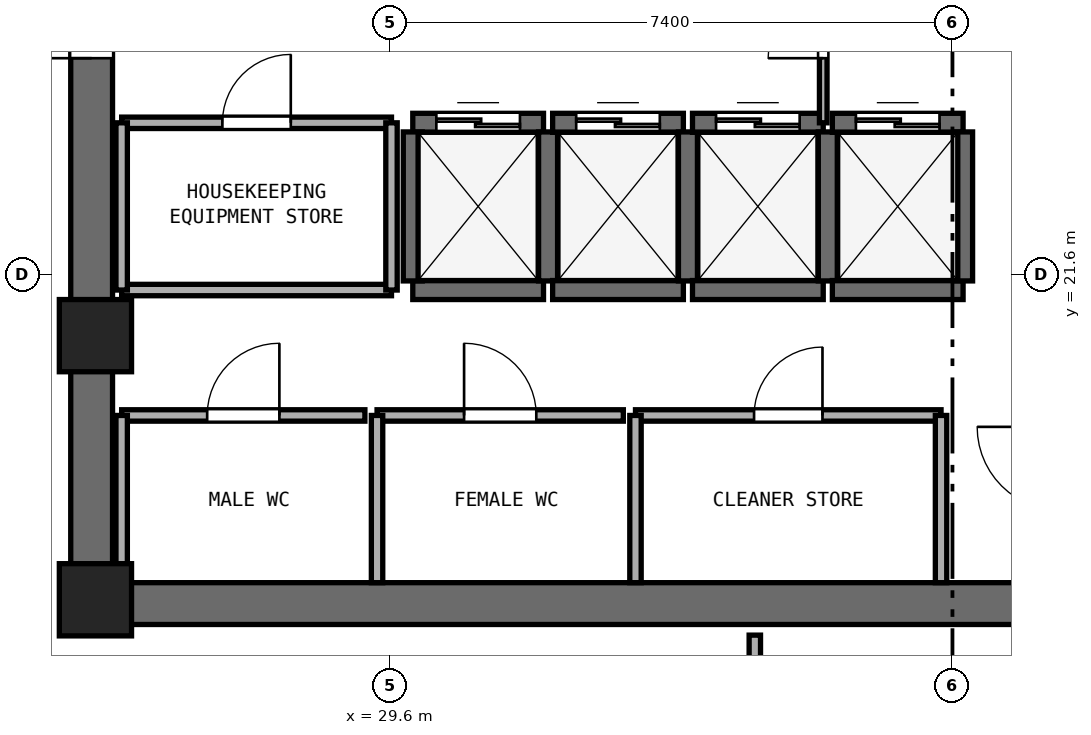
"""IFC4 building model, lengths in metres.
Left out: names, types, materials, properties, quantities, classifications, styles, units other than length and angle.
Written with IfcOpenShell. Run it as: python <this file> out.ifc"""

import sys

from ifc_helpers import new_model, si_unit, direction, frame, frame_2d, origin, origin_2d, place, context, subcontext, project, spatial, rectangle, extrude, element, fill, save


model = new_model("IFC4")
c1 = context("Model", 3, precision=1e-05, world=origin(), true_north=direction((0.0, 1.0)))
c2 = subcontext(c1, "Body", "Model", "MODEL_VIEW")
j1 = project(units=[si_unit("LENGTHUNIT", "METRE"), si_unit("PLANEANGLEUNIT", "RADIAN")], contexts=[c1])
p1 = place(None, origin())
s1 = spatial("IfcSite", under=j1, at=p1, CompositionType="ELEMENT")
p2 = place(p1, origin())
s2 = spatial("IfcBuilding", under=s1, at=p2, CompositionType="ELEMENT")
p3 = place(p2, frame((0.0, 0.0, 170.6)))
s3 = spatial("IfcBuildingStorey", under=s2, at=p3, CompositionType="ELEMENT", Elevation=170.6)
p4 = place(p3, frame((25.4, 17.275, 0.0), z_axis=(0.0, 0.0, 1.0), x_axis=(1.0, 0.0, 0.0)))
e1 = element("IfcWall", 1, at=p4, inside=s3, PredefinedType="SHEAR", context=c2, shape_type="SweptSolid", body=[
    extrude(rectangle(XDim=23.2, YDim=0.55, at=frame_2d((11.6, 0.0))), origin(), (0.0, 0.0, 1.0), 3.54),
])
p5 = place(p3, frame((25.675, 17.55, 0.0), z_axis=(0.0, 0.0, 1.0), x_axis=(0.0, 1.0, 0.0)))
e2 = element("IfcWall", 2, at=p5, inside=s3, PredefinedType="SHEAR", context=c2, shape_type="SweptSolid", body=[
    extrude(rectangle(XDim=15.3, YDim=0.55, at=frame_2d((7.65, 0.0))), origin(), (0.0, 0.0, 1.0), 3.54),
])
p6 = place(p5, frame((6.9, 0.0, 0.0)))
e3 = element("IfcOpeningElement", 3, at=p6, cuts=e2, PredefinedType="OPENING", context=c2, shape_type="SweptSolid", body=[
    extrude(rectangle(XDim=1.5, YDim=2.15, at=frame_2d((0.75, 1.075))), frame((0.0, 0.285, 0.0), z_axis=(0.0, -1.0, 0.0), x_axis=(1.0, 0.0, 0.0)), (0.0, 0.0, 1.0), 0.57),
])
for number, where, z_axis, x_axis in (
    (4, (25.725, 17.325, 0.0), (0.0, 0.0, 1.0), (1.0, 0.0, 0.0)),
    (5, (25.725, 20.8, 0.0), (0.0, 0.0, 1.0), (1.0, 0.0, 0.0)),
):
    element("IfcColumn", number, at=place(p3, frame(where, z_axis=z_axis, x_axis=x_axis)), inside=s3, PredefinedType="PILASTER", context=c2, shape_type="SweptSolid", body=[
        extrude(rectangle(XDim=0.95, YDim=0.95, at=origin_2d()), origin(), (0.0, 0.0, 1.0), 3.8),
    ])
p7 = place(p3, frame((29.9, 21.4, 0.0), z_axis=(0.0, 0.0, 1.0), x_axis=(1.0, 0.0, 0.0)))
e6 = element("IfcWall", 6, at=p7, inside=s3, PredefinedType="SHEAR", context=c2, shape_type="SweptSolid", body=[
    extrude(rectangle(XDim=1.72, YDim=0.25, at=frame_2d((0.86, 0.0))), origin(), (0.0, 0.0, 1.0), 3.54),
])
p8 = place(p3, frame((29.9, 23.6, 0.0), z_axis=(0.0, 0.0, 1.0), x_axis=(1.0, 0.0, 0.0)))
e7 = element("IfcWall", 7, at=p8, inside=s3, PredefinedType="SHEAR", context=c2, shape_type="SweptSolid", body=[
    extrude(rectangle(XDim=1.72, YDim=0.25, at=frame_2d((0.86, 0.0))), origin(), (0.0, 0.0, 1.0), 3.54),
])
p9 = place(p8, frame((0.31, 0.0, 0.0)))
e8 = element("IfcOpeningElement", 8, at=p9, cuts=e7, PredefinedType="OPENING", context=c2, shape_type="SweptSolid", body=[
    extrude(rectangle(XDim=1.1, YDim=2.15, at=frame_2d((0.55, 1.075))), frame((0.0, 0.135, 0.0), z_axis=(0.0, -1.0, 0.0), x_axis=(1.0, 0.0, 0.0)), (0.0, 0.0, 1.0), 0.27),
])
for number, where, z_axis, x_axis in (
    (9, (29.9, 21.52, 0.0), (0.0, 0.0, 1.0), (0.0, 1.0, 0.0)),
    (10, (31.68, 21.52, 0.0), (0.0, 0.0, 1.0), (0.0, 1.0, 0.0)),
):
    element("IfcWall", number, at=place(p3, frame(where, z_axis=z_axis, x_axis=x_axis)), inside=s3, PredefinedType="SHEAR", context=c2, shape_type="SweptSolid", body=[
        extrude(rectangle(XDim=1.96, YDim=0.25, at=frame_2d((0.98, 0.0))), origin(), (0.0, 0.0, 1.0), 3.54),
    ])
p10 = place(p3, frame((31.74, 21.4, 0.0), z_axis=(0.0, 0.0, 1.0), x_axis=(1.0, 0.0, 0.0)))
e11 = element("IfcWall", 11, at=p10, inside=s3, PredefinedType="SHEAR", context=c2, shape_type="SweptSolid", body=[
    extrude(rectangle(XDim=1.72, YDim=0.25, at=frame_2d((0.86, 0.0))), origin(), (0.0, 0.0, 1.0), 3.54),
])
p11 = place(p3, frame((31.74, 23.6, 0.0), z_axis=(0.0, 0.0, 1.0), x_axis=(1.0, 0.0, 0.0)))
e12 = element("IfcWall", 12, at=p11, inside=s3, PredefinedType="SHEAR", context=c2, shape_type="SweptSolid", body=[
    extrude(rectangle(XDim=1.72, YDim=0.25, at=frame_2d((0.86, 0.0))), origin(), (0.0, 0.0, 1.0), 3.54),
])
p12 = place(p11, frame((0.31, 0.0, 0.0)))
e13 = element("IfcOpeningElement", 13, at=p12, cuts=e12, PredefinedType="OPENING", context=c2, shape_type="SweptSolid", body=[
    extrude(rectangle(XDim=1.1, YDim=2.15, at=frame_2d((0.55, 1.075))), frame((0.0, 0.135, 0.0), z_axis=(0.0, -1.0, 0.0), x_axis=(1.0, 0.0, 0.0)), (0.0, 0.0, 1.0), 0.27),
])
p13 = place(p3, frame((33.52, 21.52, 0.0), z_axis=(0.0, 0.0, 1.0), x_axis=(0.0, 1.0, 0.0)))
e14 = element("IfcWall", 14, at=p13, inside=s3, PredefinedType="SHEAR", context=c2, shape_type="SweptSolid", body=[
    extrude(rectangle(XDim=1.96, YDim=0.25, at=frame_2d((0.98, 0.0))), origin(), (0.0, 0.0, 1.0), 3.54),
])
p14 = place(p3, frame((33.58, 21.4, 0.0), z_axis=(0.0, 0.0, 1.0), x_axis=(1.0, 0.0, 0.0)))
e15 = element("IfcWall", 15, at=p14, inside=s3, PredefinedType="SHEAR", context=c2, shape_type="SweptSolid", body=[
    extrude(rectangle(XDim=1.72, YDim=0.25, at=frame_2d((0.86, 0.0))), origin(), (0.0, 0.0, 1.0), 3.54),
])
p15 = place(p3, frame((33.58, 23.6, 0.0), z_axis=(0.0, 0.0, 1.0), x_axis=(1.0, 0.0, 0.0)))
e16 = element("IfcWall", 16, at=p15, inside=s3, PredefinedType="SHEAR", context=c2, shape_type="SweptSolid", body=[
    extrude(rectangle(XDim=1.72, YDim=0.25, at=frame_2d((0.86, 0.0))), origin(), (0.0, 0.0, 1.0), 3.54),
])
p16 = place(p15, frame((0.31, 0.0, 0.0)))
e17 = element("IfcOpeningElement", 17, at=p16, cuts=e16, PredefinedType="OPENING", context=c2, shape_type="SweptSolid", body=[
    extrude(rectangle(XDim=1.1, YDim=2.15, at=frame_2d((0.55, 1.075))), frame((0.0, 0.135, 0.0), z_axis=(0.0, -1.0, 0.0), x_axis=(1.0, 0.0, 0.0)), (0.0, 0.0, 1.0), 0.27),
])
p17 = place(p3, frame((35.36, 21.52, 0.0), z_axis=(0.0, 0.0, 1.0), x_axis=(0.0, 1.0, 0.0)))
e18 = element("IfcWall", 18, at=p17, inside=s3, PredefinedType="SHEAR", context=c2, shape_type="SweptSolid", body=[
    extrude(rectangle(XDim=1.96, YDim=0.25, at=frame_2d((0.98, 0.0))), origin(), (0.0, 0.0, 1.0), 3.54),
])
p18 = place(p3, frame((35.42, 21.4, 0.0), z_axis=(0.0, 0.0, 1.0), x_axis=(1.0, 0.0, 0.0)))
e19 = element("IfcWall", 19, at=p18, inside=s3, PredefinedType="SHEAR", context=c2, shape_type="SweptSolid", body=[
    extrude(rectangle(XDim=1.72, YDim=0.25, at=frame_2d((0.86, 0.0))), origin(), (0.0, 0.0, 1.0), 3.54),
])
p19 = place(p3, frame((35.42, 23.6, 0.0), z_axis=(0.0, 0.0, 1.0), x_axis=(1.0, 0.0, 0.0)))
e20 = element("IfcWall", 20, at=p19, inside=s3, PredefinedType="SHEAR", context=c2, shape_type="SweptSolid", body=[
    extrude(rectangle(XDim=1.72, YDim=0.25, at=frame_2d((0.86, 0.0))), origin(), (0.0, 0.0, 1.0), 3.54),
])
p20 = place(p19, frame((0.31, 0.0, 0.0)))
e21 = element("IfcOpeningElement", 21, at=p20, cuts=e20, PredefinedType="OPENING", context=c2, shape_type="SweptSolid", body=[
    extrude(rectangle(XDim=1.1, YDim=2.15, at=frame_2d((0.55, 1.075))), frame((0.0, 0.135, 0.0), z_axis=(0.0, -1.0, 0.0), x_axis=(1.0, 0.0, 0.0)), (0.0, 0.0, 1.0), 0.27),
])
p21 = place(p3, frame((37.14, 21.52, 0.0), z_axis=(0.0, 0.0, 1.0), x_axis=(0.0, 1.0, 0.0)))
e22 = element("IfcWall", 22, at=p21, inside=s3, PredefinedType="SHEAR", context=c2, shape_type="SweptSolid", body=[
    extrude(rectangle(XDim=1.96, YDim=0.25, at=frame_2d((0.98, 0.0))), origin(), (0.0, 0.0, 1.0), 3.54),
])
p22 = place(p3, frame((26.07, 19.75, 0.0), z_axis=(0.0, 0.0, 1.0), x_axis=(1.0, 0.0, 0.0)))
e23 = element("IfcWall", 23, at=p22, inside=s3, PredefinedType="PARTITIONING", context=c2, shape_type="SweptSolid", body=[
    extrude(rectangle(XDim=3.2, YDim=0.15, at=frame_2d((1.6, 0.0))), origin(), (0.0, 0.0, 1.0), 3.54),
])
p23 = place(p22, frame((1.125, 0.0, 0.0)))
e24 = element("IfcOpeningElement", 24, at=p23, cuts=e23, PredefinedType="OPENING", context=c2, shape_type="SweptSolid", body=[
    extrude(rectangle(XDim=0.95, YDim=2.1, at=frame_2d((0.475, 1.05))), frame((0.0, 0.085, 0.0), z_axis=(0.0, -1.0, 0.0), x_axis=(1.0, 0.0, 0.0)), (0.0, 0.0, 1.0), 0.17),
])
p24 = place(p3, frame((26.07, 17.55, 0.0), z_axis=(0.0, 0.0, 1.0), x_axis=(0.0, 1.0, 0.0)))
e25 = element("IfcWall", 25, at=p24, inside=s3, PredefinedType="PARTITIONING", context=c2, shape_type="SweptSolid", body=[
    extrude(rectangle(XDim=2.2, YDim=0.15, at=frame_2d((1.1, 0.0))), origin(), (0.0, 0.0, 1.0), 2.64),
])
p25 = place(p3, frame((29.43, 19.75, 0.0), z_axis=(0.0, 0.0, 1.0), x_axis=(1.0, 0.0, 0.0)))
e26 = element("IfcWall", 26, at=p25, inside=s3, PredefinedType="PARTITIONING", context=c2, shape_type="SweptSolid", body=[
    extrude(rectangle(XDim=3.24, YDim=0.15, at=frame_2d((1.62, 0.0))), origin(), (0.0, 0.0, 1.0), 3.54),
])
p26 = place(p25, frame((1.145, 0.0, 0.0)))
e27 = element("IfcOpeningElement", 27, at=p26, cuts=e26, PredefinedType="OPENING", context=c2, shape_type="SweptSolid", body=[
    extrude(rectangle(XDim=0.95, YDim=2.1, at=frame_2d((0.475, 1.05))), frame((0.0, 0.085, 0.0), z_axis=(0.0, -1.0, 0.0), x_axis=(1.0, 0.0, 0.0)), (0.0, 0.0, 1.0), 0.17),
])
p27 = place(p3, frame((29.43, 17.55, 0.0), z_axis=(0.0, 0.0, 1.0), x_axis=(0.0, 1.0, 0.0)))
e28 = element("IfcWall", 28, at=p27, inside=s3, PredefinedType="PARTITIONING", context=c2, shape_type="SweptSolid", body=[
    extrude(rectangle(XDim=2.2, YDim=0.15, at=frame_2d((1.1, 0.0))), origin(), (0.0, 0.0, 1.0), 3.54),
])
p28 = place(p3, frame((32.83, 19.75, 0.0), z_axis=(0.0, 0.0, 1.0), x_axis=(1.0, 0.0, 0.0)))
e29 = element("IfcWall", 29, at=p28, inside=s3, PredefinedType="PARTITIONING", context=c2, shape_type="SweptSolid", body=[
    extrude(rectangle(XDim=4.02, YDim=0.15, at=frame_2d((2.01, 0.0))), origin(), (0.0, 0.0, 1.0), 3.54),
])
p29 = place(p28, frame((1.56, 0.0, 0.0)))
e30 = element("IfcOpeningElement", 30, at=p29, cuts=e29, PredefinedType="OPENING", context=c2, shape_type="SweptSolid", body=[
    extrude(rectangle(XDim=0.9, YDim=2.1, at=frame_2d((0.45, 1.05))), frame((0.0, 0.085, 0.0), z_axis=(0.0, -1.0, 0.0), x_axis=(1.0, 0.0, 0.0)), (0.0, 0.0, 1.0), 0.17),
])
for number, where, z_axis, x_axis in (
    (31, (32.83, 17.55, 0.0), (0.0, 0.0, 1.0), (0.0, 1.0, 0.0)),
    (32, (36.85, 17.55, 0.0), (0.0, 0.0, 1.0), (0.0, 1.0, 0.0)),
):
    element("IfcWall", number, at=place(p3, frame(where, z_axis=z_axis, x_axis=x_axis)), inside=s3, PredefinedType="PARTITIONING", context=c2, shape_type="SweptSolid", body=[
        extrude(rectangle(XDim=2.2, YDim=0.15, at=frame_2d((1.1, 0.0))), origin(), (0.0, 0.0, 1.0), 3.54),
    ])
p30 = place(p3, frame((26.07, 21.4, 0.0), z_axis=(0.0, 0.0, 1.0), x_axis=(1.0, 0.0, 0.0)))
e33 = element("IfcWall", 33, at=p30, inside=s3, PredefinedType="PARTITIONING", context=c2, shape_type="SweptSolid", body=[
    extrude(rectangle(XDim=3.55, YDim=0.15, at=frame_2d((1.775, 0.0))), origin(), (0.0, 0.0, 1.0), 3.54),
])
p31 = place(p3, frame((26.07, 23.6, 0.0), z_axis=(0.0, 0.0, 1.0), x_axis=(1.0, 0.0, 0.0)))
e34 = element("IfcWall", 34, at=p31, inside=s3, PredefinedType="PARTITIONING", context=c2, shape_type="SweptSolid", body=[
    extrude(rectangle(XDim=3.55, YDim=0.15, at=frame_2d((1.775, 0.0))), origin(), (0.0, 0.0, 1.0), 3.54),
])
p32 = place(p31, frame((1.325, 0.0, 0.0)))
e35 = element("IfcOpeningElement", 35, at=p32, cuts=e34, PredefinedType="OPENING", context=c2, shape_type="SweptSolid", body=[
    extrude(rectangle(XDim=0.9, YDim=2.1, at=frame_2d((0.45, 1.05))), frame((0.0, 0.085, 0.0), z_axis=(0.0, -1.0, 0.0), x_axis=(1.0, 0.0, 0.0)), (0.0, 0.0, 1.0), 0.17),
])
p33 = place(p3, frame((26.07, 21.4, 0.0), z_axis=(0.0, 0.0, 1.0), x_axis=(0.0, 1.0, 0.0)))
e36 = element("IfcWall", 36, at=p33, inside=s3, PredefinedType="PARTITIONING", context=c2, shape_type="SweptSolid", body=[
    extrude(rectangle(XDim=2.2, YDim=0.15, at=frame_2d((1.1, 0.0))), origin(), (0.0, 0.0, 1.0), 2.64),
])
p34 = place(p3, frame((29.62, 21.4, 0.0), z_axis=(0.0, 0.0, 1.0), x_axis=(0.0, 1.0, 0.0)))
e37 = element("IfcWall", 37, at=p34, inside=s3, PredefinedType="PARTITIONING", context=c2, shape_type="SweptSolid", body=[
    extrude(rectangle(XDim=2.2, YDim=0.15, at=frame_2d((1.1, 0.0))), origin(), (0.0, 0.0, 1.0), 3.54),
])
p35 = place(p3, frame((35.3, 23.6, 0.0), z_axis=(0.0, 0.0, 1.0), x_axis=(0.0, 1.0, 0.0)))
e38 = element("IfcWall", 38, at=p35, inside=s3, PredefinedType="PARTITIONING", context=c2, shape_type="SweptSolid", body=[
    extrude(rectangle(XDim=3.2, YDim=0.1, at=frame_2d((1.6, 0.0))), origin(), (0.0, 0.0, 1.0), 3.54),
])
p36 = place(p35, frame((0.85, 0.0, 0.0)))
e39 = element("IfcOpeningElement", 39, at=p36, cuts=e38, PredefinedType="OPENING", context=c2, shape_type="SweptSolid", body=[
    extrude(rectangle(XDim=1.45, YDim=2.12, at=frame_2d((0.725, 1.06))), frame((0.0, 0.06, 0.0), z_axis=(0.0, -1.0, 0.0), x_axis=(1.0, 0.0, 0.0)), (0.0, 0.0, 1.0), 0.12),
])
p37 = place(p3, frame((34.4, 15.2, 0.0), z_axis=(0.0, 0.0, 1.0), x_axis=(0.0, 1.0, 0.0)))
e40 = element("IfcWall", 40, at=p37, inside=s3, PredefinedType="PARTITIONING", context=c2, shape_type="SweptSolid", body=[
    extrude(rectangle(XDim=1.66, YDim=0.15, at=frame_2d((0.83, 0.0))), origin(), (0.0, 0.0, 1.0), 3.54),
])
p38 = place(p9, origin())
e41 = element("IfcDoor", 41, at=p38, inside=s3, OperationType="DOUBLE_DOOR_SLIDING", PredefinedType="DOOR", context=c2, shape_type="SweptSolid", body=[
    extrude(rectangle(XDim=1.1, YDim=2.15, at=frame_2d((0.55, 1.075))), frame((0.0, 0.025, 0.0), z_axis=(0.0, -1.0, 0.0), x_axis=(1.0, 0.0, 0.0)), (0.0, 0.0, 1.0), 0.05),
])
fill(e8, e41)
p39 = place(p12, origin())
e42 = element("IfcDoor", 42, at=p39, inside=s3, OperationType="DOUBLE_DOOR_SLIDING", PredefinedType="DOOR", context=c2, shape_type="SweptSolid", body=[
    extrude(rectangle(XDim=1.1, YDim=2.15, at=frame_2d((0.55, 1.075))), frame((0.0, 0.025, 0.0), z_axis=(0.0, -1.0, 0.0), x_axis=(1.0, 0.0, 0.0)), (0.0, 0.0, 1.0), 0.05),
])
fill(e13, e42)
p40 = place(p16, origin())
e43 = element("IfcDoor", 43, at=p40, inside=s3, OperationType="DOUBLE_DOOR_SLIDING", PredefinedType="DOOR", context=c2, shape_type="SweptSolid", body=[
    extrude(rectangle(XDim=1.1, YDim=2.15, at=frame_2d((0.55, 1.075))), frame((0.0, 0.025, 0.0), z_axis=(0.0, -1.0, 0.0), x_axis=(1.0, 0.0, 0.0)), (0.0, 0.0, 1.0), 0.05),
])
fill(e17, e43)
p41 = place(p20, origin())
e44 = element("IfcDoor", 44, at=p41, inside=s3, OperationType="DOUBLE_DOOR_SLIDING", PredefinedType="DOOR", context=c2, shape_type="SweptSolid", body=[
    extrude(rectangle(XDim=1.1, YDim=2.15, at=frame_2d((0.55, 1.075))), frame((0.0, 0.025, 0.0), z_axis=(0.0, -1.0, 0.0), x_axis=(1.0, 0.0, 0.0)), (0.0, 0.0, 1.0), 0.05),
])
fill(e21, e44)
p42 = place(p6, origin())
e45 = element("IfcDoor", 45, at=p42, inside=s3, OperationType="DOUBLE_DOOR_SINGLE_SWING", PredefinedType="DOOR", context=c2, shape_type="SweptSolid", body=[
    extrude(rectangle(XDim=1.5, YDim=2.15, at=frame_2d((0.75, 1.075))), frame((0.0, 0.025, 0.0), z_axis=(0.0, -1.0, 0.0), x_axis=(1.0, 0.0, 0.0)), (0.0, 0.0, 1.0), 0.05),
])
fill(e3, e45)
p43 = place(p23, origin())
e46 = element("IfcDoor", 46, at=p43, inside=s3, OperationType="SINGLE_SWING_RIGHT", PredefinedType="DOOR", context=c2, shape_type="SweptSolid", body=[
    extrude(rectangle(XDim=0.95, YDim=2.1, at=frame_2d((0.475, 1.05))), frame((0.0, 0.025, 0.0), z_axis=(0.0, -1.0, 0.0), x_axis=(1.0, 0.0, 0.0)), (0.0, 0.0, 1.0), 0.05),
])
fill(e24, e46)
p44 = place(p26, origin())
e47 = element("IfcDoor", 47, at=p44, inside=s3, OperationType="SINGLE_SWING_LEFT", PredefinedType="DOOR", context=c2, shape_type="SweptSolid", body=[
    extrude(rectangle(XDim=0.95, YDim=2.1, at=frame_2d((0.475, 1.05))), frame((0.0, 0.025, 0.0), z_axis=(0.0, -1.0, 0.0), x_axis=(1.0, 0.0, 0.0)), (0.0, 0.0, 1.0), 0.05),
])
fill(e27, e47)
p45 = place(p29, origin())
e48 = element("IfcDoor", 48, at=p45, inside=s3, OperationType="SINGLE_SWING_RIGHT", PredefinedType="DOOR", context=c2, shape_type="SweptSolid", body=[
    extrude(rectangle(XDim=0.9, YDim=2.1, at=frame_2d((0.45, 1.05))), frame((0.0, 0.025, 0.0), z_axis=(0.0, -1.0, 0.0), x_axis=(1.0, 0.0, 0.0)), (0.0, 0.0, 1.0), 0.05),
])
fill(e30, e48)
p46 = place(p32, origin())
e49 = element("IfcDoor", 49, at=p46, inside=s3, OperationType="SINGLE_SWING_RIGHT", PredefinedType="DOOR", context=c2, shape_type="SweptSolid", body=[
    extrude(rectangle(XDim=0.9, YDim=2.1, at=frame_2d((0.45, 1.05))), frame((0.0, 0.025, 0.0), z_axis=(0.0, -1.0, 0.0), x_axis=(1.0, 0.0, 0.0)), (0.0, 0.0, 1.0), 0.05),
])
fill(e35, e49)
p47 = place(p36, origin())
e50 = element("IfcDoor", 50, at=p47, inside=s3, OperationType="DOUBLE_DOOR_SINGLE_SWING", PredefinedType="DOOR", context=c2, shape_type="SweptSolid", body=[
    extrude(rectangle(XDim=1.45, YDim=2.12, at=frame_2d((0.725, 1.06))), frame((0.0, 0.025, 0.0), z_axis=(0.0, -1.0, 0.0), x_axis=(1.0, 0.0, 0.0)), (0.0, 0.0, 1.0), 0.05),
])
fill(e39, e50)
save(model, sys.argv[1])
